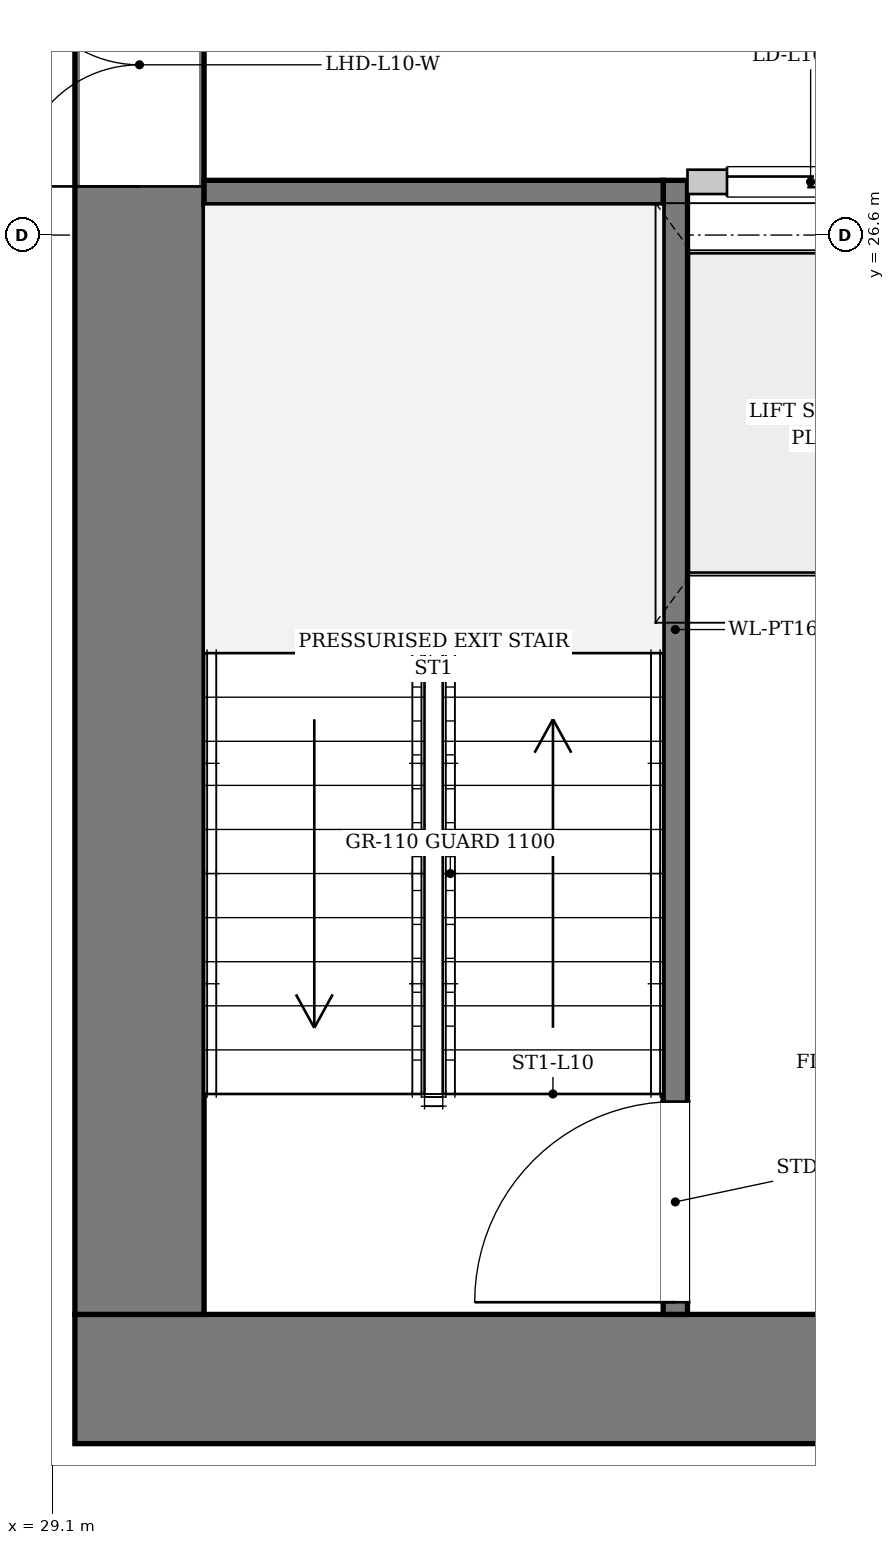
"""IFC4 building model, lengths in metres.
Left out: names, types, materials, properties, quantities, classifications, styles, units other than length and angle.
Written with IfcOpenShell. Run it as: python <this file> out.ifc"""

import sys

from ifc_helpers import new_model, si_unit, direction, frame, frame_2d, origin, place, context, subcontext, project, spatial, rectangle, extrude, source, transform, mapped, element, fill, save


model = new_model("IFC4")
c1 = context("Model", 3, precision=1e-05, world=origin(), true_north=direction((0.0, 1.0)))
c2 = subcontext(c1, "Body", "Model", "MODEL_VIEW")
j1 = project(units=[si_unit("LENGTHUNIT", "METRE"), si_unit("PLANEANGLEUNIT", "RADIAN")], contexts=[c1])
p1 = place(None, origin())
s1 = spatial("IfcSite", under=j1, at=p1, CompositionType="ELEMENT")
p2 = place(p1, origin())
s2 = spatial("IfcBuilding", under=s1, at=p2, CompositionType="ELEMENT")
p3 = place(p2, frame((0.0, 0.0, 43.5)))
s3 = spatial("IfcBuildingStorey", under=s2, at=p3, CompositionType="ELEMENT", Elevation=43.5)
p4 = place(p3, frame((46.75, 19.075, 0.0), z_axis=(0.0, 0.0, 1.0), x_axis=(-1.0, 0.0, 0.0)))
e1 = element("IfcWall", 1, at=p4, inside=s3, PredefinedType="SHEAR", context=c2, shape_type="SweptSolid", body=[
    extrude(rectangle(XDim=17.5, YDim=0.85, at=frame_2d((8.75, 0.0))), origin(), (0.0, 0.0, 1.0), 3.3),
])
p5 = place(p4, frame((4.95, 0.0, 0.0)))
e2 = element("IfcOpeningElement", 2, at=p5, cuts=e1, PredefinedType="OPENING", context=c2, shape_type="SweptSolid", body=[
    extrude(rectangle(XDim=1.12, YDim=2.25, at=frame_2d((0.56, 1.125))), frame((0.0, 0.435, 0.0), z_axis=(0.0, -1.0, 0.0), x_axis=(1.0, 0.0, 0.0)), (0.0, 0.0, 1.0), 0.87),
])
p6 = place(p4, frame((11.45, 0.0, 0.0)))
e3 = element("IfcOpeningElement", 3, at=p6, cuts=e1, PredefinedType="OPENING", context=c2, shape_type="SweptSolid", body=[
    extrude(rectangle(XDim=1.12, YDim=2.25, at=frame_2d((0.56, 1.125))), frame((0.0, 0.435, 0.0), z_axis=(0.0, -1.0, 0.0), x_axis=(1.0, 0.0, 0.0)), (0.0, 0.0, 1.0), 0.87),
])
p7 = place(p3, frame((29.675, 19.5, 0.0), z_axis=(0.0, 0.0, 1.0), x_axis=(0.0, 1.0, 0.0)))
e4 = element("IfcWall", 4, at=p7, inside=s3, PredefinedType="SHEAR", context=c2, shape_type="SweptSolid", body=[
    extrude(rectangle(XDim=14.2, YDim=0.85, at=frame_2d((7.1, 0.0))), origin(), (0.0, 0.0, 1.0), 3.3),
])
p8 = place(p7, frame((7.42, 0.0, 0.0)))
e5 = element("IfcOpeningElement", 5, at=p8, cuts=e4, PredefinedType="OPENING", context=c2, shape_type="SweptSolid", body=[
    extrude(rectangle(XDim=1.6, YDim=2.2, at=frame_2d((0.8, 1.1))), frame((0.0, 0.435, 0.0), z_axis=(0.0, -1.0, 0.0), x_axis=(1.0, 0.0, 0.0)), (0.0, 0.0, 1.0), 0.87),
])
p9 = place(p3, frame((33.2, 19.5, 0.0), z_axis=(0.0, 0.0, 1.0), x_axis=(0.0, 1.0, 0.0)))
e6 = element("IfcWall", 6, at=p9, inside=s3, PredefinedType="PARTITIONING", context=c2, shape_type="SweptSolid", body=[
    extrude(rectangle(XDim=7.46, YDim=0.16, at=frame_2d((3.73, 0.0))), origin(), (0.0, 0.0, 1.0), 3.3),
])
p10 = place(p9, frame((0.08, 0.0, 0.0)))
e7 = element("IfcOpeningElement", 7, at=p10, cuts=e6, PredefinedType="OPENING", context=c2, shape_type="SweptSolid", body=[
    extrude(rectangle(XDim=1.32, YDim=2.2, at=frame_2d((0.66, 1.1))), frame((0.0, 0.09, 0.0), z_axis=(0.0, -1.0, 0.0), x_axis=(1.0, 0.0, 0.0)), (0.0, 0.0, 1.0), 0.18),
])
p11 = place(p3, frame((30.1, 26.88, 0.0), z_axis=(0.0, 0.0, 1.0), x_axis=(1.0, 0.0, 0.0)))
e8 = element("IfcWall", 8, at=p11, inside=s3, PredefinedType="PARTITIONING", context=c2, shape_type="SweptSolid", body=[
    extrude(rectangle(XDim=3.02, YDim=0.16, at=frame_2d((1.51, 0.0))), origin(), (0.0, 0.0, 1.0), 3.3),
])
p12 = place(p3, frame((33.28, 24.49, 0.0), z_axis=(0.0, 0.0, 1.0), x_axis=(1.0, 0.0, 0.0)))
e9 = element("IfcWall", 9, at=p12, inside=s3, PredefinedType="PARTITIONING", context=c2, shape_type="SweptSolid", body=[
    extrude(rectangle(XDim=9.44, YDim=0.16, at=frame_2d((4.72, 0.0))), origin(), (0.0, 0.0, 1.0), 3.3),
])
p13 = place(p3, frame((33.28, 26.95, 0.0), z_axis=(0.0, 0.0, 1.0), x_axis=(1.0, 0.0, 0.0)))
e10 = element("IfcWall", 10, at=p13, inside=s3, PredefinedType="PARTITIONING", context=c2, shape_type="SweptSolid", body=[
    extrude(rectangle(XDim=9.44, YDim=0.16, at=frame_2d((4.72, 0.0))), origin(), (0.0, 0.0, 1.0), 3.3),
])
p14 = place(p13, frame((0.26, 0.0, 0.0)))
e11 = element("IfcOpeningElement", 11, at=p14, cuts=e10, PredefinedType="OPENING", context=c2, shape_type="SweptSolid", body=[
    extrude(rectangle(XDim=1.1, YDim=2.2, at=frame_2d((0.55, 1.1))), frame((0.0, 0.09, 0.0), z_axis=(0.0, -1.0, 0.0), x_axis=(1.0, 0.0, 0.0)), (0.0, 0.0, 1.0), 0.18),
])
p15 = place(p13, frame((2.01, 0.0, 0.0)))
e12 = element("IfcOpeningElement", 12, at=p15, cuts=e10, PredefinedType="OPENING", context=c2, shape_type="SweptSolid", body=[
    extrude(rectangle(XDim=1.1, YDim=2.2, at=frame_2d((0.55, 1.1))), frame((0.0, 0.09, 0.0), z_axis=(0.0, -1.0, 0.0), x_axis=(1.0, 0.0, 0.0)), (0.0, 0.0, 1.0), 0.18),
])
p16 = place(p13, frame((3.76, 0.0, 0.0)))
e13 = element("IfcOpeningElement", 13, at=p16, cuts=e10, PredefinedType="OPENING", context=c2, shape_type="SweptSolid", body=[
    extrude(rectangle(XDim=1.1, YDim=2.2, at=frame_2d((0.55, 1.1))), frame((0.0, 0.09, 0.0), z_axis=(0.0, -1.0, 0.0), x_axis=(1.0, 0.0, 0.0)), (0.0, 0.0, 1.0), 0.18),
])
p17 = place(p13, frame((5.51, 0.0, 0.0)))
e14 = element("IfcOpeningElement", 14, at=p17, cuts=e10, PredefinedType="OPENING", context=c2, shape_type="SweptSolid", body=[
    extrude(rectangle(XDim=1.1, YDim=2.2, at=frame_2d((0.55, 1.1))), frame((0.0, 0.09, 0.0), z_axis=(0.0, -1.0, 0.0), x_axis=(1.0, 0.0, 0.0)), (0.0, 0.0, 1.0), 0.18),
])
m1 = source(origin(), c2, "Body", "SweptSolid", [
    extrude(rectangle(XDim=1.6, YDim=2.2, at=frame_2d((0.8, 1.1))), frame((0.0, 0.025, 0.0), z_axis=(0.0, -1.0, 0.0), x_axis=(1.0, 0.0, 0.0)), (0.0, 0.0, 1.0), 0.05),
])
p18 = place(p8, origin())
e15 = element("IfcDoor", 15, at=p18, inside=s3, OperationType="DOUBLE_DOOR_SINGLE_SWING", PredefinedType="DOOR", context=c2, shape_type="MappedRepresentation", body=[
    mapped(m1, transform((0.0, 0.0, 0.0), x_axis=(1.0, 0.0, 0.0), y_axis=(0.0, 1.0, 0.0), z_axis=(0.0, 0.0, 1.0), scale=1.0)),
])
fill(e5, e15)
m2 = source(origin(), c2, "Body", "SweptSolid", [
    extrude(rectangle(XDim=1.32, YDim=2.2, at=frame_2d((0.66, 1.1))), frame((0.0, 0.025, 0.0), z_axis=(0.0, -1.0, 0.0), x_axis=(1.0, 0.0, 0.0)), (0.0, 0.0, 1.0), 0.05),
])
p19 = place(p10, origin())
e16 = element("IfcDoor", 16, at=p19, inside=s3, OperationType="SINGLE_SWING_LEFT", PredefinedType="DOOR", context=c2, shape_type="MappedRepresentation", body=[
    mapped(m2, transform((0.0, 0.0, 0.0), x_axis=(1.0, 0.0, 0.0), y_axis=(0.0, 1.0, 0.0), z_axis=(0.0, 0.0, 1.0), scale=1.0)),
])
fill(e7, e16)
m3 = source(origin(), c2, "Body", "SweptSolid", [
    extrude(rectangle(XDim=1.1, YDim=2.2, at=frame_2d((0.55, 1.1))), frame((0.0, 0.025, 0.0), z_axis=(0.0, -1.0, 0.0), x_axis=(1.0, 0.0, 0.0)), (0.0, 0.0, 1.0), 0.05),
])
p20 = place(p14, origin())
e17 = element("IfcDoor", 17, at=p20, inside=s3, OperationType="DOUBLE_DOOR_SLIDING", PredefinedType="DOOR", context=c2, shape_type="MappedRepresentation", body=[
    mapped(m3, transform((0.0, 0.0, 0.0), x_axis=(1.0, 0.0, 0.0), y_axis=(0.0, 1.0, 0.0), z_axis=(0.0, 0.0, 1.0), scale=1.0)),
])
fill(e11, e17)
save(model, sys.argv[1])
